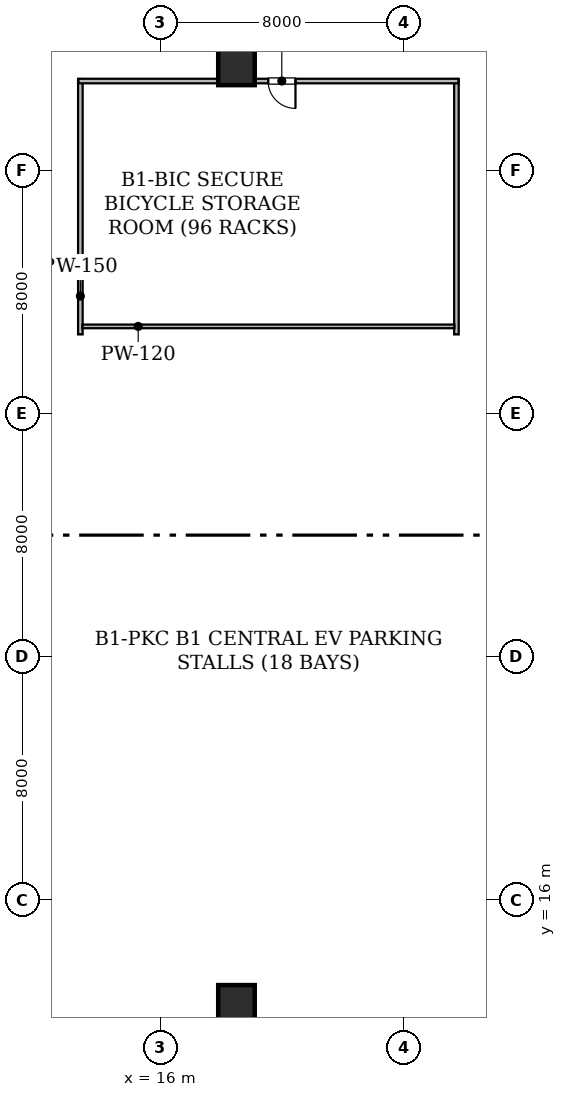
"""IFC4 building model, lengths in metres.
Left out: names, types, materials, properties, quantities, classifications, styles, units other than length and angle.
Written with IfcOpenShell. Run it as: python <this file> out.ifc"""

import sys

from ifc_helpers import new_model, si_unit, direction, frame, frame_2d, origin, origin_2d, place, context, subcontext, project, spatial, rectangle, hollow_rectangle, extrude, element, fill, save


model = new_model("IFC4")
c1 = context("Model", 3, precision=1e-05, world=origin(), true_north=direction((0.0, 1.0)))
c2 = subcontext(c1, "Body", "Model", "MODEL_VIEW")
j1 = project(units=[si_unit("LENGTHUNIT", "METRE"), si_unit("PLANEANGLEUNIT", "RADIAN")], contexts=[c1])
p1 = place(None, origin())
s1 = spatial("IfcSite", under=j1, at=p1, CompositionType="ELEMENT")
p2 = place(p1, origin())
s2 = spatial("IfcBuilding", under=s1, at=p2, CompositionType="ELEMENT")
p3 = place(p2, frame((0.0, 0.0, -4.5)))
s3 = spatial("IfcBuildingStorey", under=s2, at=p3, CompositionType="ELEMENT", Elevation=-4.5)
for number, where, z_axis, x_axis in (
    (1, (18.5, 12.6, 0.0), (0.0, 0.0, 1.0), (1.0, 0.0, 0.0)),
    (2, (18.5, 43.4, 0.0), (0.0, 0.0, 1.0), (1.0, 0.0, 0.0)),
):
    element("IfcColumn", number, at=place(p3, frame(where, z_axis=z_axis, x_axis=x_axis)), inside=s3, PredefinedType="COLUMN", context=c2, shape_type="SweptSolid", body=[
        extrude(hollow_rectangle(XDim=1.2, YDim=1.2, WallThickness=0.06, at=origin_2d()), origin(), (0.0, 0.0, 1.0), 4.5),
    ])
for number, where, z_axis, x_axis in (
    (3, (13.365, 43.0, 0.0), (0.0, 0.0, 1.0), (0.0, -1.0, 0.0)),
    (4, (25.735, 34.602, 0.0), (0.0, 0.0, 1.0), (0.0, 1.0, 0.0)),
):
    element("IfcWall", number, at=place(p3, frame(where, z_axis=z_axis, x_axis=x_axis)), inside=s3, PredefinedType="STANDARD", context=c2, shape_type="SweptSolid", body=[
        extrude(rectangle(XDim=8.398, YDim=0.15, at=frame_2d((4.199, 0.0))), origin(), (0.0, 0.0, 1.0), 3.275),
    ])
p4 = place(p3, frame((25.8, 42.935, 0.0), z_axis=(0.0, 0.0, 1.0), x_axis=(-1.0, 0.0, 0.0)))
e5 = element("IfcWall", 5, at=p4, inside=s3, PredefinedType="STANDARD", context=c2, shape_type="SweptSolid", body=[
    extrude(rectangle(XDim=12.498, YDim=0.15, at=frame_2d((6.249, 0.0))), origin(), (0.0, 0.0, 1.0), 3.275),
])
p5 = place(p4, frame((5.359, 0.0, 0.0)))
e6 = element("IfcOpeningElement", 6, at=p5, cuts=e5, PredefinedType="OPENING", context=c2, shape_type="SweptSolid", body=[
    extrude(rectangle(XDim=0.9, YDim=2.1, at=frame_2d((0.45, 1.05))), frame((0.0, 0.085, 0.0), z_axis=(0.0, -1.0, 0.0), x_axis=(1.0, 0.0, 0.0)), (0.0, 0.0, 1.0), 0.17),
])
p6 = place(p3, frame((13.432, 34.865, 0.0), z_axis=(0.0, 0.0, 1.0), x_axis=(1.0, 0.0, 0.0)))
e7 = element("IfcWall", 7, at=p6, inside=s3, PredefinedType="PARTITIONING", context=c2, shape_type="SweptSolid", body=[
    extrude(rectangle(XDim=12.236, YDim=0.12, at=frame_2d((6.118, 0.0))), origin(), (0.0, 0.0, 1.0), 3.275),
])
p7 = place(p5, origin())
e8 = element("IfcDoor", 8, at=p7, inside=s3, OperationType="SINGLE_SWING_LEFT", PredefinedType="DOOR", context=c2, shape_type="SweptSolid", body=[
    extrude(rectangle(XDim=0.9, YDim=2.1, at=frame_2d((0.45, 1.05))), frame((0.0, 0.025, 0.0), z_axis=(0.0, -1.0, 0.0), x_axis=(1.0, 0.0, 0.0)), (0.0, 0.0, 1.0), 0.05),
])
fill(e6, e8)
save(model, sys.argv[1])
